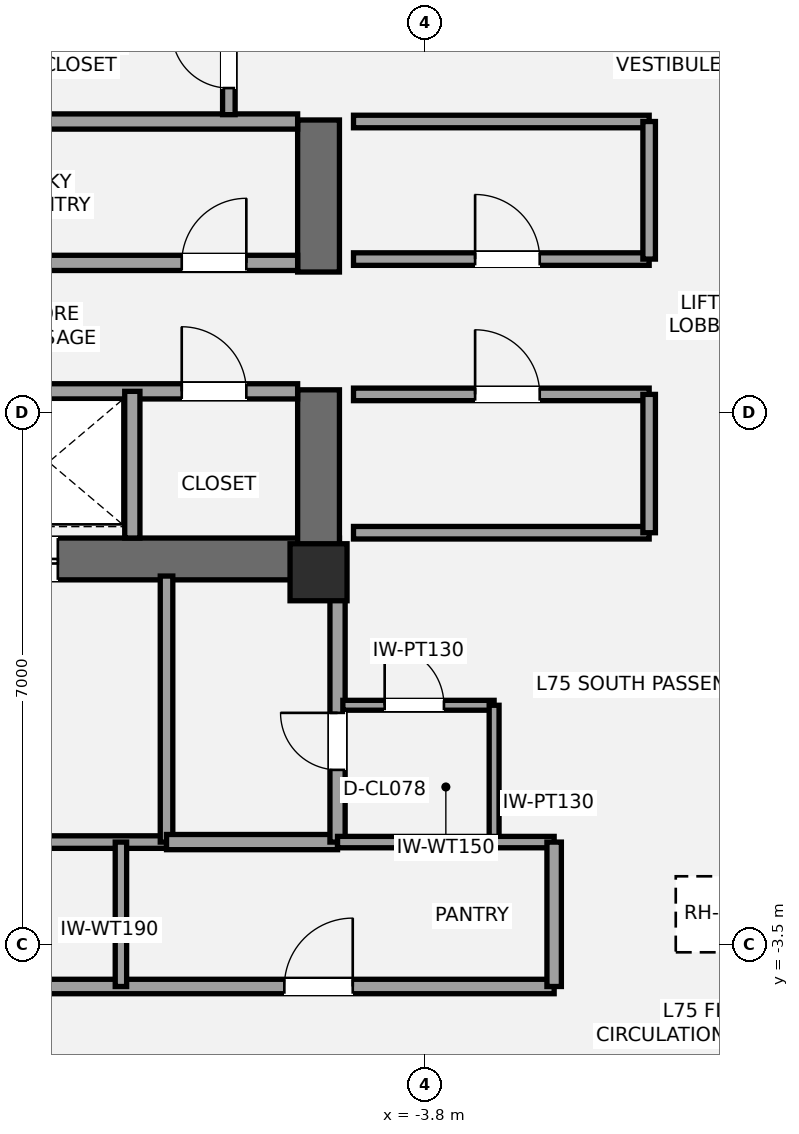
"""IFC4 building model, lengths in metres.
Left out: names, types, materials, properties, quantities, classifications, styles, units other than length and angle.
Written with IfcOpenShell. Run it as: python <this file> out.ifc"""

import sys

from ifc_helpers import new_model, si_unit, direction, frame, frame_2d, origin, origin_2d, place, context, subcontext, project, spatial, rectangle, extrude, element, fill, save


model = new_model("IFC4")
c1 = context("Model", 3, precision=1e-05, world=origin(), true_north=direction((0.0, 1.0)))
c2 = subcontext(c1, "Body", "Model", "MODEL_VIEW")
j1 = project(units=[si_unit("LENGTHUNIT", "METRE"), si_unit("PLANEANGLEUNIT", "RADIAN")], contexts=[c1])
p1 = place(None, origin())
s1 = spatial("IfcSite", under=j1, at=p1, CompositionType="ELEMENT")
p2 = place(p1, origin())
s2 = spatial("IfcBuilding", under=s1, at=p2, CompositionType="ELEMENT")
p3 = place(p2, frame((0.0, 0.0, 264.8)))
s3 = spatial("IfcBuildingStorey", under=s2, at=p3, CompositionType="ELEMENT", Elevation=264.8)
p4 = place(p3, frame((-4.925, 1.575, 0.0), z_axis=(0.0, 0.0, 1.0), x_axis=(-1.0, 0.0, 0.0)))
e1 = element("IfcWall", 1, at=p4, inside=s3, PredefinedType="SHEAR", context=c2, shape_type="SweptSolid", body=[
    extrude(rectangle(XDim=8.775, YDim=0.55, at=frame_2d((4.387, 0.0))), origin(), (0.0, 0.0, 1.0), 4.4),
])
p5 = place(p4, frame((5.375, 0.0, 0.0)))
e2 = element("IfcOpeningElement", 2, at=p5, cuts=e1, PredefinedType="OPENING", context=c2, shape_type="SweptSolid", body=[
    extrude(rectangle(XDim=1.05, YDim=2.15, at=frame_2d((0.525, 1.075))), frame((0.0, 0.285, 0.0), z_axis=(0.0, -1.0, 0.0), x_axis=(1.0, 0.0, 0.0)), (0.0, 0.0, 1.0), 0.57),
])
p6 = place(p4, frame((3.705, 0.0, 0.0)))
e3 = element("IfcOpeningElement", 3, at=p6, cuts=e1, PredefinedType="OPENING", context=c2, shape_type="SweptSolid", body=[
    extrude(rectangle(XDim=1.1, YDim=2.2, at=frame_2d((0.55, 1.1))), frame((0.0, 0.285, 0.0), z_axis=(0.0, -1.0, 0.0), x_axis=(1.0, 0.0, 0.0)), (0.0, 0.0, 1.0), 0.57),
])
p7 = place(p3, frame((-5.2, 1.3, 0.0), z_axis=(0.0, 0.0, 1.0), x_axis=(0.0, 1.0, 0.0)))
e4 = element("IfcWall", 4, at=p7, inside=s3, PredefinedType="SHEAR", context=c2, shape_type="SweptSolid", body=[
    extrude(rectangle(XDim=2.5, YDim=0.55, at=frame_2d((1.25, 0.0))), origin(), (0.0, 0.0, 1.0), 4.4),
])
p8 = place(p3, frame((-5.2, 5.35, 0.0), z_axis=(0.0, 0.0, 1.0), x_axis=(0.0, 1.0, 0.0)))
e5 = element("IfcWall", 5, at=p8, inside=s3, PredefinedType="SHEAR", context=c2, shape_type="SweptSolid", body=[
    extrude(rectangle(XDim=2.0, YDim=0.55, at=frame_2d((1.0, 0.0))), origin(), (0.0, 0.0, 1.0), 4.4),
])
p9 = place(p3, frame((-5.2, 1.4, 0.0), z_axis=(0.0, 0.0, 1.0), x_axis=(1.0, 0.0, 0.0)))
e6 = element("IfcColumn", 6, at=p9, inside=s3, PredefinedType="PILASTER", context=c2, shape_type="SweptSolid", body=[
    extrude(rectangle(XDim=0.75, YDim=0.75, at=origin_2d()), origin(), (0.0, 0.0, 1.0), 4.4),
])
p10 = place(p3, frame((-13.45, -2.15, 0.0), z_axis=(0.0, 0.0, 1.0), x_axis=(1.0, 0.0, 0.0)))
e7 = element("IfcWall", 7, at=p10, inside=s3, PredefinedType="PARTITIONING", context=c2, shape_type="SweptSolid", body=[
    extrude(rectangle(XDim=6.25, YDim=0.165, at=frame_2d((3.125, 0.0))), origin(), (0.0, 0.0, 1.0), 4.2),
])
p11 = place(p3, frame((-7.2, -2.15, 0.0), z_axis=(0.0, 0.0, 1.0), x_axis=(0.0, 1.0, 0.0)))
e8 = element("IfcWall", 8, at=p11, inside=s3, PredefinedType="PARTITIONING", context=c2, shape_type="SweptSolid", body=[
    extrude(rectangle(XDim=3.5, YDim=0.165, at=frame_2d((1.75, 0.0))), origin(), (0.0, 0.0, 1.0), 4.2),
])
p12 = place(p3, frame((-7.2, -2.15, 0.0), z_axis=(0.0, 0.0, 1.0), x_axis=(1.0, 0.0, 0.0)))
e9 = element("IfcWall", 9, at=p12, inside=s3, PredefinedType="SOLIDWALL", context=c2, shape_type="SweptSolid", body=[
    extrude(rectangle(XDim=2.25, YDim=0.2, at=frame_2d((1.125, 0.0))), origin(), (0.0, 0.0, 1.0), 4.2),
])
p13 = place(p3, frame((-4.95, -2.15, 0.0), z_axis=(0.0, 0.0, 1.0), x_axis=(0.0, 1.0, 0.0)))
e10 = element("IfcWall", 10, at=p13, inside=s3, PredefinedType="SOLIDWALL", context=c2, shape_type="SweptSolid", body=[
    extrude(rectangle(XDim=3.5, YDim=0.2, at=frame_2d((1.75, 0.0))), origin(), (0.0, 0.0, 1.0), 3.568),
])
p14 = place(p13, frame((0.95, 0.0, 0.0)))
e11 = element("IfcOpeningElement", 11, at=p14, cuts=e10, PredefinedType="OPENING", context=c2, shape_type="SweptSolid", body=[
    extrude(rectangle(XDim=0.75, YDim=2.1, at=frame_2d((0.375, 1.05))), frame((0.0, 0.11, 0.0), z_axis=(0.0, -1.0, 0.0), x_axis=(1.0, 0.0, 0.0)), (0.0, 0.0, 1.0), 0.22),
])
p15 = place(p3, frame((-4.88, -0.35, 0.0), z_axis=(0.0, 0.0, 1.0), x_axis=(1.0, 0.0, 0.0)))
e12 = element("IfcWall", 12, at=p15, inside=s3, PredefinedType="PARTITIONING", context=c2, shape_type="SweptSolid", body=[
    extrude(rectangle(XDim=1.99, YDim=0.13, at=frame_2d((0.995, 0.0))), origin(), (0.0, 0.0, 1.0), 4.2),
])
p16 = place(p15, frame((0.55, 0.0, 0.0)))
e13 = element("IfcOpeningElement", 13, at=p16, cuts=e12, PredefinedType="OPENING", context=c2, shape_type="SweptSolid", body=[
    extrude(rectangle(XDim=0.78, YDim=2.1, at=frame_2d((0.39, 1.05))), frame((0.0, 0.075, 0.0), z_axis=(0.0, -1.0, 0.0), x_axis=(1.0, 0.0, 0.0)), (0.0, 0.0, 1.0), 0.15),
])
p17 = place(p3, frame((-2.89, -2.15, 0.0), z_axis=(0.0, 0.0, 1.0), x_axis=(0.0, 1.0, 0.0)))
e14 = element("IfcWall", 14, at=p17, inside=s3, PredefinedType="PARTITIONING", context=c2, shape_type="SweptSolid", body=[
    extrude(rectangle(XDim=1.8, YDim=0.13, at=frame_2d((0.9, 0.0))), origin(), (0.0, 0.0, 1.0), 4.2),
])
p18 = place(p3, frame((-9.78, 3.78, 0.0), z_axis=(0.0, 0.0, 1.0), x_axis=(1.0, 0.0, 0.0)))
e15 = element("IfcWall", 15, at=p18, inside=s3, PredefinedType="SOLIDWALL", context=c2, shape_type="SweptSolid", body=[
    extrude(rectangle(XDim=4.305, YDim=0.2, at=frame_2d((2.152, 0.0))), origin(), (0.0, 0.0, 1.0), 4.2),
])
p19 = place(p18, frame((2.78, 0.0, 0.0)))
e16 = element("IfcOpeningElement", 16, at=p19, cuts=e15, PredefinedType="OPENING", context=c2, shape_type="SweptSolid", body=[
    extrude(rectangle(XDim=0.85, YDim=2.1, at=frame_2d((0.425, 1.05))), frame((0.0, 0.11, 0.0), z_axis=(0.0, -1.0, 0.0), x_axis=(1.0, 0.0, 0.0)), (0.0, 0.0, 1.0), 0.22),
])
p20 = place(p3, frame((-7.65, 1.85, 0.0), z_axis=(0.0, 0.0, 1.0), x_axis=(0.0, 1.0, 0.0)))
e17 = element("IfcWall", 17, at=p20, inside=s3, PredefinedType="SOLIDWALL", context=c2, shape_type="SweptSolid", body=[
    extrude(rectangle(XDim=1.93, YDim=0.2, at=frame_2d((0.965, 0.0))), origin(), (0.0, 0.0, 1.0), 4.2),
])
p21 = place(p3, frame((-9.78, 5.47, 0.0), z_axis=(0.0, 0.0, 1.0), x_axis=(1.0, 0.0, 0.0)))
e18 = element("IfcWall", 18, at=p21, inside=s3, PredefinedType="SOLIDWALL", context=c2, shape_type="SweptSolid", body=[
    extrude(rectangle(XDim=4.305, YDim=0.2, at=frame_2d((2.152, 0.0))), origin(), (0.0, 0.0, 1.0), 4.2),
])
p22 = place(p21, frame((2.78, 0.0, 0.0)))
e19 = element("IfcOpeningElement", 19, at=p22, cuts=e18, PredefinedType="OPENING", context=c2, shape_type="SweptSolid", body=[
    extrude(rectangle(XDim=0.85, YDim=2.1, at=frame_2d((0.425, 1.05))), frame((0.0, 0.11, 0.0), z_axis=(0.0, -1.0, 0.0), x_axis=(1.0, 0.0, 0.0)), (0.0, 0.0, 1.0), 0.22),
])
p23 = place(p3, frame((-9.78, 7.33, 0.0), z_axis=(0.0, 0.0, 1.0), x_axis=(1.0, 0.0, 0.0)))
e20 = element("IfcWall", 20, at=p23, inside=s3, PredefinedType="SOLIDWALL", context=c2, shape_type="SweptSolid", body=[
    extrude(rectangle(XDim=4.305, YDim=0.2, at=frame_2d((2.152, 0.0))), origin(), (0.0, 0.0, 1.0), 4.2),
])
p24 = place(p3, frame((-4.74, 1.92, 0.0), z_axis=(0.0, 0.0, 1.0), x_axis=(1.0, 0.0, 0.0)))
e21 = element("IfcWall", 21, at=p24, inside=s3, PredefinedType="PARTITIONING", context=c2, shape_type="SweptSolid", body=[
    extrude(rectangle(XDim=3.89, YDim=0.165, at=frame_2d((1.945, 0.0))), origin(), (0.0, 0.0, 1.0), 3.34),
])
p25 = place(p3, frame((-4.74, 3.74, 0.0), z_axis=(0.0, 0.0, 1.0), x_axis=(1.0, 0.0, 0.0)))
e22 = element("IfcWall", 22, at=p25, inside=s3, PredefinedType="PARTITIONING", context=c2, shape_type="SweptSolid", body=[
    extrude(rectangle(XDim=3.89, YDim=0.165, at=frame_2d((1.945, 0.0))), origin(), (0.0, 0.0, 1.0), 4.2),
])
p26 = place(p25, frame((1.6, 0.0, 0.0)))
e23 = element("IfcOpeningElement", 23, at=p26, cuts=e22, PredefinedType="OPENING", context=c2, shape_type="SweptSolid", body=[
    extrude(rectangle(XDim=0.85, YDim=2.1, at=frame_2d((0.425, 1.05))), frame((0.0, 0.093, 0.0), z_axis=(0.0, -1.0, 0.0), x_axis=(1.0, 0.0, 0.0)), (0.0, 0.0, 1.0), 0.185),
])
p27 = place(p3, frame((-0.85, 1.92, 0.0), z_axis=(0.0, 0.0, 1.0), x_axis=(0.0, 1.0, 0.0)))
e24 = element("IfcWall", 24, at=p27, inside=s3, PredefinedType="PARTITIONING", context=c2, shape_type="SweptSolid", body=[
    extrude(rectangle(XDim=1.82, YDim=0.165, at=frame_2d((0.91, 0.0))), origin(), (0.0, 0.0, 1.0), 4.2),
])
p28 = place(p3, frame((-4.74, 5.52, 0.0), z_axis=(0.0, 0.0, 1.0), x_axis=(1.0, 0.0, 0.0)))
e25 = element("IfcWall", 25, at=p28, inside=s3, PredefinedType="PARTITIONING", context=c2, shape_type="SweptSolid", body=[
    extrude(rectangle(XDim=3.89, YDim=0.165, at=frame_2d((1.945, 0.0))), origin(), (0.0, 0.0, 1.0), 4.2),
])
p29 = place(p28, frame((1.6, 0.0, 0.0)))
e26 = element("IfcOpeningElement", 26, at=p29, cuts=e25, PredefinedType="OPENING", context=c2, shape_type="SweptSolid", body=[
    extrude(rectangle(XDim=0.85, YDim=2.1, at=frame_2d((0.425, 1.05))), frame((0.0, 0.093, 0.0), z_axis=(0.0, -1.0, 0.0), x_axis=(1.0, 0.0, 0.0)), (0.0, 0.0, 1.0), 0.185),
])
p30 = place(p3, frame((-4.74, 7.33, 0.0), z_axis=(0.0, 0.0, 1.0), x_axis=(1.0, 0.0, 0.0)))
e27 = element("IfcWall", 27, at=p30, inside=s3, PredefinedType="PARTITIONING", context=c2, shape_type="SweptSolid", body=[
    extrude(rectangle(XDim=3.89, YDim=0.165, at=frame_2d((1.945, 0.0))), origin(), (0.0, 0.0, 1.0), 4.2),
])
p31 = place(p3, frame((-0.85, 5.52, 0.0), z_axis=(0.0, 0.0, 1.0), x_axis=(0.0, 1.0, 0.0)))
e28 = element("IfcWall", 28, at=p31, inside=s3, PredefinedType="PARTITIONING", context=c2, shape_type="SweptSolid", body=[
    extrude(rectangle(XDim=1.81, YDim=0.165, at=frame_2d((0.905, 0.0))), origin(), (0.0, 0.0, 1.0), 4.2),
])
p32 = place(p3, frame((-6.38, 7.42, 0.0), z_axis=(0.0, 0.0, 1.0), x_axis=(0.0, 1.0, 0.0)))
e29 = element("IfcWall", 29, at=p32, inside=s3, PredefinedType="PARTITIONING", context=c2, shape_type="SweptSolid", body=[
    extrude(rectangle(XDim=1.58, YDim=0.165, at=frame_2d((0.79, 0.0))), origin(), (0.0, 0.0, 1.0), 4.2),
])
p33 = place(p32, frame((0.35, 0.0, 0.0)))
e30 = element("IfcOpeningElement", 30, at=p33, cuts=e29, PredefinedType="OPENING", context=c2, shape_type="SweptSolid", body=[
    extrude(rectangle(XDim=0.75, YDim=2.1, at=frame_2d((0.375, 1.05))), frame((0.0, 0.093, 0.0), z_axis=(0.0, -1.0, 0.0), x_axis=(1.0, 0.0, 0.0)), (0.0, 0.0, 1.0), 0.185),
])
p34 = place(p3, frame((-13.45, -4.05, 0.0), z_axis=(0.0, 0.0, 1.0), x_axis=(1.0, 0.0, 0.0)))
e31 = element("IfcWall", 31, at=p34, inside=s3, PredefinedType="PLUMBINGWALL", context=c2, shape_type="SweptSolid", body=[
    extrude(rectangle(XDim=11.35, YDim=0.19, at=frame_2d((5.675, 0.0))), origin(), (0.0, 0.0, 1.0), 3.587),
])
p35 = place(p34, frame((2.2, 0.0, 0.0)))
e32 = element("IfcOpeningElement", 32, at=p35, cuts=e31, PredefinedType="OPENING", context=c2, shape_type="SweptSolid", body=[
    extrude(rectangle(XDim=0.95, YDim=2.15, at=frame_2d((0.475, 1.075))), frame((0.0, 0.105, 0.0), z_axis=(0.0, -1.0, 0.0), x_axis=(1.0, 0.0, 0.0)), (0.0, 0.0, 1.0), 0.21),
])
p36 = place(p34, frame((7.8, 0.0, 0.0)))
e33 = element("IfcOpeningElement", 33, at=p36, cuts=e31, PredefinedType="OPENING", context=c2, shape_type="SweptSolid", body=[
    extrude(rectangle(XDim=0.9, YDim=2.1, at=frame_2d((0.45, 1.05))), frame((0.0, 0.105, 0.0), z_axis=(0.0, -1.0, 0.0), x_axis=(1.0, 0.0, 0.0)), (0.0, 0.0, 1.0), 0.21),
])
p37 = place(p3, frame((-4.95, -2.15, 0.0), z_axis=(0.0, 0.0, 1.0), x_axis=(1.0, 0.0, 0.0)))
e34 = element("IfcWall", 34, at=p37, inside=s3, PredefinedType="PLUMBINGWALL", context=c2, shape_type="SweptSolid", body=[
    extrude(rectangle(XDim=2.85, YDim=0.15, at=frame_2d((1.425, 0.0))), origin(), (0.0, 0.0, 1.0), 4.2),
])
p38 = place(p3, frame((-2.1, -4.05, 0.0), z_axis=(0.0, 0.0, 1.0), x_axis=(0.0, 1.0, 0.0)))
e35 = element("IfcWall", 35, at=p38, inside=s3, PredefinedType="PLUMBINGWALL", context=c2, shape_type="SweptSolid", body=[
    extrude(rectangle(XDim=1.9, YDim=0.19, at=frame_2d((0.95, 0.0))), origin(), (0.0, 0.0, 1.0), 4.2),
])
p39 = place(p3, frame((-7.8, -4.05, 0.0), z_axis=(0.0, 0.0, 1.0), x_axis=(0.0, 1.0, 0.0)))
e36 = element("IfcWall", 36, at=p39, inside=s3, PredefinedType="PLUMBINGWALL", context=c2, shape_type="SweptSolid", body=[
    extrude(rectangle(XDim=1.9, YDim=0.15, at=frame_2d((0.95, 0.0))), origin(), (0.0, 0.0, 1.0), 4.2),
])
p40 = place(p2, frame((0.0, 0.0, 269.2)))
p41 = place(p40, frame((0.0, 0.0, -0.2)))
p42 = place(p41, frame((0.0, -3.1, 0.0)))
p43 = place(p42, frame((0.0, 0.0, 0.15)))
e37 = element("IfcDoor", 37, at=p43, inside=s3, OperationType="SINGLE_SWING_LEFT", PredefinedType="TRAPDOOR", context=c2, shape_type="SweptSolid", body=[
    extrude(rectangle(XDim=1.0, YDim=1.0, at=origin_2d()), origin(), (0.0, 0.0, 1.0), 0.05),
])
p44 = place(p14, origin())
e38 = element("IfcDoor", 38, at=p44, inside=s3, OperationType="SINGLE_SWING_RIGHT", PredefinedType="DOOR", context=c2, shape_type="SweptSolid", body=[
    extrude(rectangle(XDim=0.75, YDim=2.1, at=frame_2d((0.375, 1.05))), frame((0.0, 0.025, 0.0), z_axis=(0.0, -1.0, 0.0), x_axis=(1.0, 0.0, 0.0)), (0.0, 0.0, 1.0), 0.05),
])
fill(e11, e38)
p45 = place(p16, origin())
e39 = element("IfcDoor", 39, at=p45, inside=s3, OperationType="SINGLE_SWING_LEFT", PredefinedType="DOOR", context=c2, shape_type="SweptSolid", body=[
    extrude(rectangle(XDim=0.78, YDim=2.1, at=frame_2d((0.39, 1.05))), frame((0.0, 0.025, 0.0), z_axis=(0.0, -1.0, 0.0), x_axis=(1.0, 0.0, 0.0)), (0.0, 0.0, 1.0), 0.05),
])
fill(e13, e39)
p46 = place(p6, origin())
e40 = element("IfcDoor", 40, at=p46, inside=s3, OperationType="SLIDING_TO_LEFT", PredefinedType="DOOR", context=c2, shape_type="SweptSolid", body=[
    extrude(rectangle(XDim=1.1, YDim=2.2, at=frame_2d((0.55, 1.1))), frame((0.0, 0.025, 0.0), z_axis=(0.0, -1.0, 0.0), x_axis=(1.0, 0.0, 0.0)), (0.0, 0.0, 1.0), 0.05),
])
fill(e3, e40)
p47 = place(p22, origin())
e41 = element("IfcDoor", 41, at=p47, inside=s3, OperationType="SINGLE_SWING_RIGHT", PredefinedType="DOOR", context=c2, shape_type="SweptSolid", body=[
    extrude(rectangle(XDim=0.85, YDim=2.1, at=frame_2d((0.425, 1.05))), frame((0.0, 0.025, 0.0), z_axis=(0.0, -1.0, 0.0), x_axis=(1.0, 0.0, 0.0)), (0.0, 0.0, 1.0), 0.05),
])
fill(e19, e41)
p48 = place(p19, origin())
e42 = element("IfcDoor", 42, at=p48, inside=s3, OperationType="SINGLE_SWING_LEFT", PredefinedType="DOOR", context=c2, shape_type="SweptSolid", body=[
    extrude(rectangle(XDim=0.85, YDim=2.1, at=frame_2d((0.425, 1.05))), frame((0.0, 0.025, 0.0), z_axis=(0.0, -1.0, 0.0), x_axis=(1.0, 0.0, 0.0)), (0.0, 0.0, 1.0), 0.05),
])
fill(e16, e42)
p49 = place(p26, origin())
e43 = element("IfcDoor", 43, at=p49, inside=s3, OperationType="SINGLE_SWING_LEFT", PredefinedType="DOOR", context=c2, shape_type="SweptSolid", body=[
    extrude(rectangle(XDim=0.85, YDim=2.1, at=frame_2d((0.425, 1.05))), frame((0.0, 0.025, 0.0), z_axis=(0.0, -1.0, 0.0), x_axis=(1.0, 0.0, 0.0)), (0.0, 0.0, 1.0), 0.05),
])
fill(e23, e43)
p50 = place(p29, origin())
e44 = element("IfcDoor", 44, at=p50, inside=s3, OperationType="SINGLE_SWING_LEFT", PredefinedType="DOOR", context=c2, shape_type="SweptSolid", body=[
    extrude(rectangle(XDim=0.85, YDim=2.1, at=frame_2d((0.425, 1.05))), frame((0.0, 0.025, 0.0), z_axis=(0.0, -1.0, 0.0), x_axis=(1.0, 0.0, 0.0)), (0.0, 0.0, 1.0), 0.05),
])
fill(e26, e44)
p51 = place(p33, origin())
e45 = element("IfcDoor", 45, at=p51, inside=s3, OperationType="SINGLE_SWING_RIGHT", PredefinedType="DOOR", context=c2, shape_type="SweptSolid", body=[
    extrude(rectangle(XDim=0.75, YDim=2.1, at=frame_2d((0.375, 1.05))), frame((0.0, 0.025, 0.0), z_axis=(0.0, -1.0, 0.0), x_axis=(1.0, 0.0, 0.0)), (0.0, 0.0, 1.0), 0.05),
])
fill(e30, e45)
p52 = place(p36, origin())
e46 = element("IfcDoor", 46, at=p52, inside=s3, OperationType="SINGLE_SWING_RIGHT", PredefinedType="DOOR", context=c2, shape_type="SweptSolid", body=[
    extrude(rectangle(XDim=0.9, YDim=2.1, at=frame_2d((0.45, 1.05))), frame((0.0, 0.025, 0.0), z_axis=(0.0, -1.0, 0.0), x_axis=(1.0, 0.0, 0.0)), (0.0, 0.0, 1.0), 0.05),
])
fill(e33, e46)
save(model, sys.argv[1])
